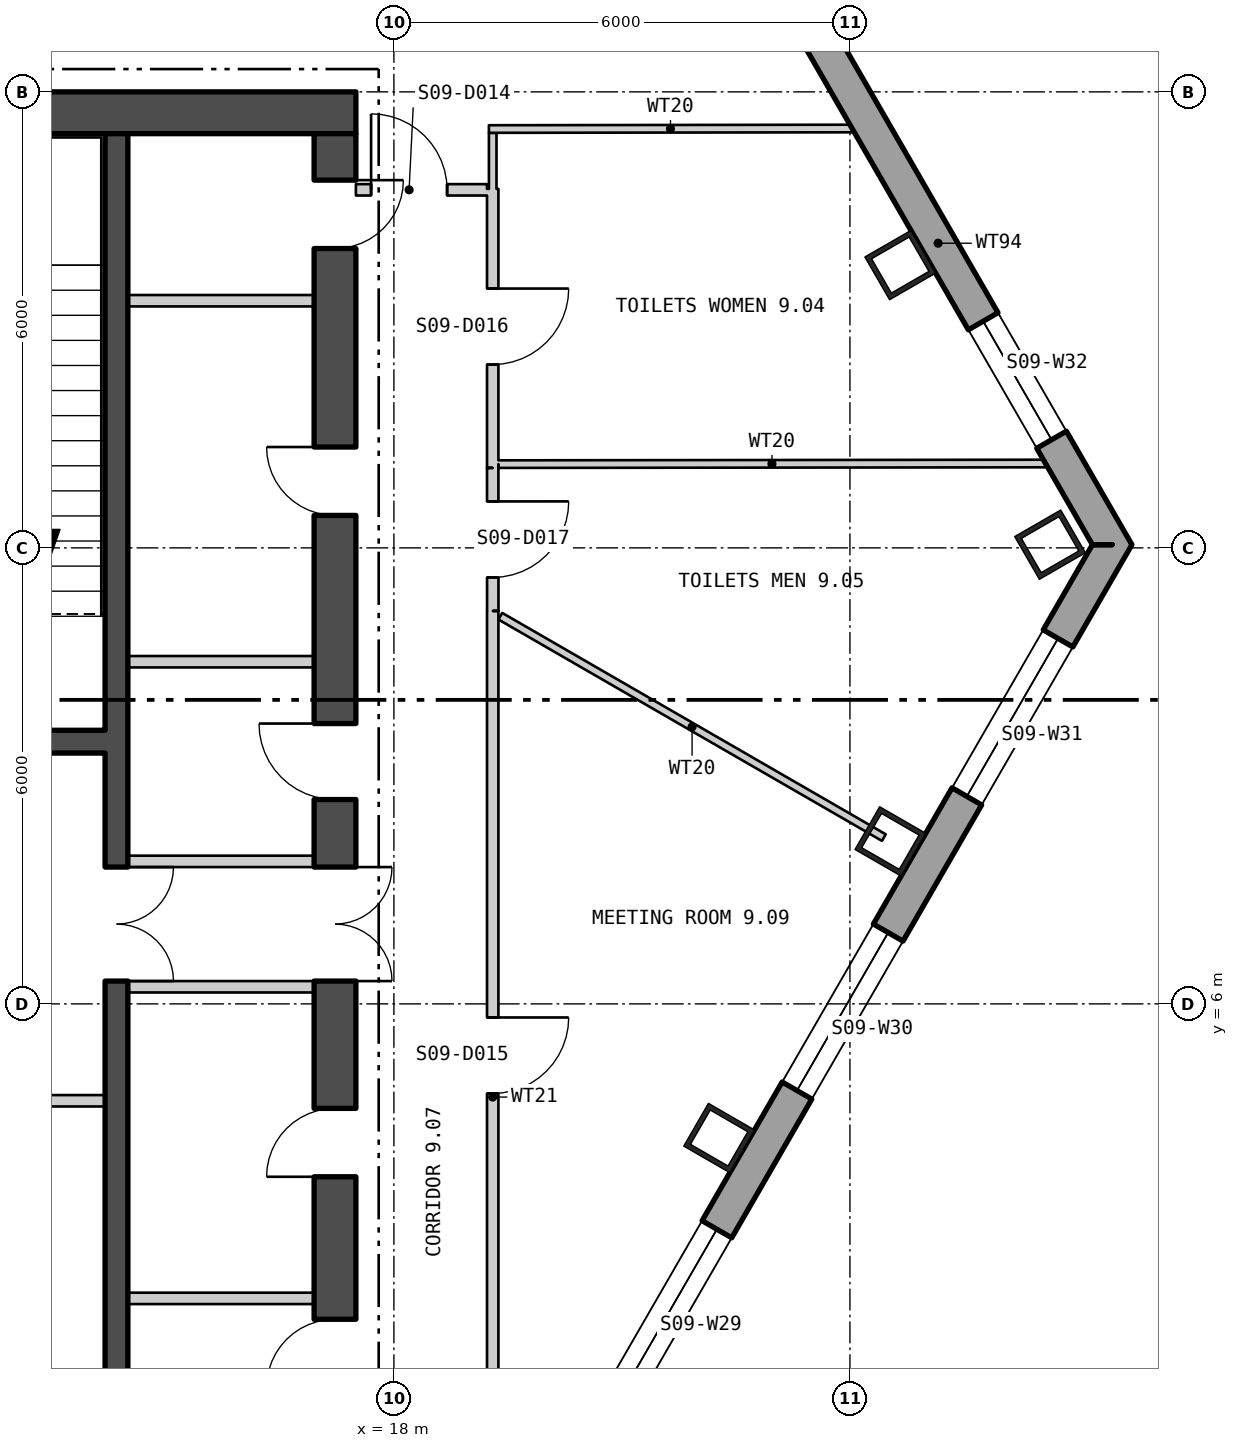
"""IFC4 building model, lengths in metres.
Left out: names, types, materials, properties, quantities, classifications, styles, units other than length and angle.
Written with IfcOpenShell. Run it as: python <this file> out.ifc"""

import sys

from ifc_helpers import new_model, si_unit, direction, frame, frame_2d, origin, origin_2d, place, context, subcontext, project, spatial, polyline, rectangle, hollow_rectangle, outline, extrude, element, fill, save


model = new_model("IFC4")
c1 = context("Model", 3, precision=1e-05, world=origin(), true_north=direction((0.0, 1.0)))
c2 = subcontext(c1, "Body", "Model", "MODEL_VIEW")
j1 = project(units=[si_unit("LENGTHUNIT", "METRE"), si_unit("PLANEANGLEUNIT", "RADIAN")], contexts=[c1])
p1 = place(None, origin())
s1 = spatial("IfcSite", under=j1, at=p1, CompositionType="ELEMENT")
p2 = place(p1, origin())
s2 = spatial("IfcBuilding", under=s1, at=p2, CompositionType="ELEMENT")
p3 = place(p2, frame((0.0, 0.0, 124.8)))
s3 = spatial("IfcBuildingStorey", under=s2, at=p3, CompositionType="ELEMENT", Elevation=124.8)
for number, where, z_axis, x_axis in (
    (1, (22.279, 4.235, 0.0), (0.0, 0.0, 1.0), (0.5, 0.866, 0.0)),
    (2, (24.532, 8.138, 0.0), (0.0, 0.0, 1.0), (0.5, 0.866, 0.0)),
    (3, (26.633, 12.042, 0.0), (0.0, 0.0, 1.0), (-0.5, 0.866, 0.0)),
    (4, (24.662, 15.721, 0.0), (0.0, 0.0, 1.0), (-0.5, 0.866, 0.0)),
):
    element("IfcColumn", number, at=place(p3, frame(where, z_axis=z_axis, x_axis=x_axis)), inside=s3, PredefinedType="COLUMN", context=c2, shape_type="SweptSolid", body=[
        extrude(hollow_rectangle(XDim=0.65, YDim=0.7, WallThickness=0.065, at=origin_2d()), origin(), (0.0, 0.0, 1.0), 4.5),
    ])
p4 = place(p3, frame((4.58, -27.57, -0.18), z_axis=(0.0, 0.0, 1.0), x_axis=(0.500000711659, 0.866024992908, 0.0)))
e5 = element("IfcWall", 5, at=p4, inside=s3, PredefinedType="SOLIDWALL", context=c2, shape_type="SweptSolid", body=[
    extrude(outline(polyline([(-0.13, -0.225), (45.87, -0.225), (45.61, 0.225), (0.13, 0.225), (-0.13, -0.225)])), origin(), (0.0, 0.0, 1.0), 4.28),
])
p5 = place(p4, frame((1.424, 0.0, 1.08)))
e6 = element("IfcOpeningElement", 6, at=p5, cuts=e5, PredefinedType="OPENING", context=c2, shape_type="SweptSolid", body=[
    extrude(rectangle(XDim=2.4, YDim=2.6, at=frame_2d((1.2, 1.3))), frame((0.0, 0.235, 0.0), z_axis=(0.0, -1.0, 0.0), x_axis=(1.0, 0.0, 0.0)), (0.0, 0.0, 1.0), 0.47),
])
p6 = place(p4, frame((5.893, 0.0, 1.08)))
e7 = element("IfcOpeningElement", 7, at=p6, cuts=e5, PredefinedType="OPENING", context=c2, shape_type="SweptSolid", body=[
    extrude(rectangle(XDim=2.4, YDim=2.6, at=frame_2d((1.2, 1.3))), frame((0.0, 0.235, 0.0), z_axis=(0.0, -1.0, 0.0), x_axis=(1.0, 0.0, 0.0)), (0.0, 0.0, 1.0), 0.47),
])
p7 = place(p4, frame((10.401, 0.0, 1.08)))
e8 = element("IfcOpeningElement", 8, at=p7, cuts=e5, PredefinedType="OPENING", context=c2, shape_type="SweptSolid", body=[
    extrude(rectangle(XDim=2.4, YDim=2.6, at=frame_2d((1.2, 1.3))), frame((0.0, 0.235, 0.0), z_axis=(0.0, -1.0, 0.0), x_axis=(1.0, 0.0, 0.0)), (0.0, 0.0, 1.0), 0.47),
])
p8 = place(p4, frame((14.909, 0.0, 1.08)))
e9 = element("IfcOpeningElement", 9, at=p8, cuts=e5, PredefinedType="OPENING", context=c2, shape_type="SweptSolid", body=[
    extrude(rectangle(XDim=2.4, YDim=2.6, at=frame_2d((1.2, 1.3))), frame((0.0, 0.235, 0.0), z_axis=(0.0, -1.0, 0.0), x_axis=(1.0, 0.0, 0.0)), (0.0, 0.0, 1.0), 0.47),
])
p9 = place(p4, frame((19.416, 0.0, 1.08)))
e10 = element("IfcOpeningElement", 10, at=p9, cuts=e5, PredefinedType="OPENING", context=c2, shape_type="SweptSolid", body=[
    extrude(rectangle(XDim=2.4, YDim=2.6, at=frame_2d((1.2, 1.3))), frame((0.0, 0.235, 0.0), z_axis=(0.0, -1.0, 0.0), x_axis=(1.0, 0.0, 0.0)), (0.0, 0.0, 1.0), 0.47),
])
p10 = place(p4, frame((23.924, 0.0, 1.08)))
e11 = element("IfcOpeningElement", 11, at=p10, cuts=e5, PredefinedType="OPENING", context=c2, shape_type="SweptSolid", body=[
    extrude(rectangle(XDim=2.4, YDim=2.6, at=frame_2d((1.2, 1.3))), frame((0.0, 0.235, 0.0), z_axis=(0.0, -1.0, 0.0), x_axis=(1.0, 0.0, 0.0)), (0.0, 0.0, 1.0), 0.47),
])
p11 = place(p4, frame((32.939, 0.0, 1.08)))
e12 = element("IfcOpeningElement", 12, at=p11, cuts=e5, PredefinedType="OPENING", context=c2, shape_type="SweptSolid", body=[
    extrude(rectangle(XDim=2.4, YDim=2.6, at=frame_2d((1.2, 1.3))), frame((0.0, 0.235, 0.0), z_axis=(0.0, -1.0, 0.0), x_axis=(1.0, 0.0, 0.0)), (0.0, 0.0, 1.0), 0.47),
])
p12 = place(p4, frame((37.447, 0.0, 1.08)))
e13 = element("IfcOpeningElement", 13, at=p12, cuts=e5, PredefinedType="OPENING", context=c2, shape_type="SweptSolid", body=[
    extrude(rectangle(XDim=2.4, YDim=2.6, at=frame_2d((1.2, 1.3))), frame((0.0, 0.235, 0.0), z_axis=(0.0, -1.0, 0.0), x_axis=(1.0, 0.0, 0.0)), (0.0, 0.0, 1.0), 0.47),
])
p13 = place(p4, frame((41.916, 0.0, 1.08)))
e14 = element("IfcOpeningElement", 14, at=p13, cuts=e5, PredefinedType="OPENING", context=c2, shape_type="SweptSolid", body=[
    extrude(rectangle(XDim=2.4, YDim=2.6, at=frame_2d((1.2, 1.3))), frame((0.0, 0.235, 0.0), z_axis=(0.0, -1.0, 0.0), x_axis=(1.0, 0.0, 0.0)), (0.0, 0.0, 1.0), 0.47),
])
p14 = place(p3, frame((27.45, 12.042, -0.4), z_axis=(0.0, 0.0, 1.0), x_axis=(-0.499998388237, 0.866026334334, 0.0)))
e15 = element("IfcWall", 15, at=p14, inside=s3, PredefinedType="SOLIDWALL", context=c2, shape_type="SweptSolid", body=[
    extrude(outline(polyline([(-0.13, -0.225), (9.29, -0.225), (9.03, 0.225), (0.13, 0.225), (-0.13, -0.225)])), origin(), (0.0, 0.0, 1.0), 4.5),
])
p15 = place(p14, frame((1.594, 0.0, 1.3)))
e16 = element("IfcOpeningElement", 16, at=p15, cuts=e15, PredefinedType="OPENING", context=c2, shape_type="SweptSolid", body=[
    extrude(rectangle(XDim=1.8, YDim=2.6, at=frame_2d((0.9, 1.3))), frame((0.0, 0.235, 0.0), z_axis=(0.0, -1.0, 0.0), x_axis=(1.0, 0.0, 0.0)), (0.0, 0.0, 1.0), 0.47),
])
p16 = place(p3, frame((-17.5, 17.725, 0.0), z_axis=(0.0, 0.0, 1.0), x_axis=(1.0, 0.0, 0.0)))
e17 = element("IfcWall", 17, at=p16, inside=s3, PredefinedType="SHEAR", context=c2, shape_type="SweptSolid", body=[
    extrude(rectangle(XDim=35.0, YDim=0.55, at=frame_2d((17.5, 0.0))), origin(), (0.0, 0.0, 1.0), 4.3),
])
p17 = place(p3, frame((17.225, 0.55, 0.0), z_axis=(0.0, 0.0, 1.0), x_axis=(0.0, 1.0, 0.0)))
e18 = element("IfcWall", 18, at=p17, inside=s3, PredefinedType="SHEAR", context=c2, shape_type="SweptSolid", body=[
    extrude(rectangle(XDim=16.9, YDim=0.55, at=frame_2d((8.45, 0.0))), origin(), (0.0, 0.0, 1.0), 4.3),
])
p18 = place(p17, frame((5.75, 0.0, 0.0)))
e19 = element("IfcOpeningElement", 19, at=p18, cuts=e18, PredefinedType="OPENING", context=c2, shape_type="SweptSolid", body=[
    extrude(rectangle(XDim=1.5, YDim=2.1, at=frame_2d((0.75, 1.05))), frame((0.0, 0.285, 0.0), z_axis=(0.0, -1.0, 0.0), x_axis=(1.0, 0.0, 0.0)), (0.0, 0.0, 1.0), 0.57),
])
p19 = place(p17, frame((0.4, 0.0, 0.0)))
e20 = element("IfcOpeningElement", 20, at=p19, cuts=e18, PredefinedType="OPENING", context=c2, shape_type="SweptSolid", body=[
    extrude(rectangle(XDim=0.9, YDim=2.1, at=frame_2d((0.45, 1.05))), frame((0.0, 0.285, 0.0), z_axis=(0.0, -1.0, 0.0), x_axis=(1.0, 0.0, 0.0)), (0.0, 0.0, 1.0), 0.57),
])
p20 = place(p17, frame((3.175, 0.0, 0.0)))
e21 = element("IfcOpeningElement", 21, at=p20, cuts=e18, PredefinedType="OPENING", context=c2, shape_type="SweptSolid", body=[
    extrude(rectangle(XDim=0.9, YDim=2.1, at=frame_2d((0.45, 1.05))), frame((0.0, 0.285, 0.0), z_axis=(0.0, -1.0, 0.0), x_axis=(1.0, 0.0, 0.0)), (0.0, 0.0, 1.0), 0.57),
])
p21 = place(p17, frame((8.139, 0.0, 0.0)))
e22 = element("IfcOpeningElement", 22, at=p21, cuts=e18, PredefinedType="OPENING", context=c2, shape_type="SweptSolid", body=[
    extrude(rectangle(XDim=1.0, YDim=2.1, at=frame_2d((0.5, 1.05))), frame((0.0, 0.285, 0.0), z_axis=(0.0, -1.0, 0.0), x_axis=(1.0, 0.0, 0.0)), (0.0, 0.0, 1.0), 0.57),
])
p22 = place(p17, frame((11.877, 0.0, 0.0)))
e23 = element("IfcOpeningElement", 23, at=p22, cuts=e18, PredefinedType="OPENING", context=c2, shape_type="SweptSolid", body=[
    extrude(rectangle(XDim=0.9, YDim=2.1, at=frame_2d((0.45, 1.05))), frame((0.0, 0.285, 0.0), z_axis=(0.0, -1.0, 0.0), x_axis=(1.0, 0.0, 0.0)), (0.0, 0.0, 1.0), 0.57),
])
p23 = place(p17, frame((15.389, 0.0, 0.0)))
e24 = element("IfcOpeningElement", 24, at=p23, cuts=e18, PredefinedType="OPENING", context=c2, shape_type="SweptSolid", body=[
    extrude(rectangle(XDim=0.9, YDim=2.1, at=frame_2d((0.45, 1.05))), frame((0.0, 0.285, 0.0), z_axis=(0.0, -1.0, 0.0), x_axis=(1.0, 0.0, 0.0)), (0.0, 0.0, 1.0), 0.57),
])
p24 = place(p3, frame((14.35, 0.55, 0.0), z_axis=(0.0, 0.0, 1.0), x_axis=(0.0, 1.0, 0.0)))
e25 = element("IfcWall", 25, at=p24, inside=s3, PredefinedType="SHEAR", context=c2, shape_type="SweptSolid", body=[
    extrude(rectangle(XDim=16.9, YDim=0.3, at=frame_2d((8.45, 0.0))), origin(), (0.0, 0.0, 1.0), 4.3),
])
p25 = place(p24, frame((5.75, 0.0, 0.0)))
e26 = element("IfcOpeningElement", 26, at=p25, cuts=e25, PredefinedType="OPENING", context=c2, shape_type="SweptSolid", body=[
    extrude(rectangle(XDim=1.5, YDim=2.1, at=frame_2d((0.75, 1.05))), frame((0.0, 0.16, 0.0), z_axis=(0.0, -1.0, 0.0), x_axis=(1.0, 0.0, 0.0)), (0.0, 0.0, 1.0), 0.32),
])
p26 = place(p3, frame((11.0, 9.45, 0.0), z_axis=(0.0, 0.0, 1.0), x_axis=(1.0, 0.0, 0.0)))
e27 = element("IfcWall", 27, at=p26, inside=s3, PredefinedType="SHEAR", context=c2, shape_type="SweptSolid", body=[
    extrude(rectangle(XDim=3.2, YDim=0.3, at=frame_2d((1.6, 0.0))), origin(), (0.0, 0.0, 1.0), 4.3),
])
p27 = place(p26, frame((1.0, 0.0, 0.0)))
e28 = element("IfcOpeningElement", 28, at=p27, cuts=e27, PredefinedType="OPENING", context=c2, shape_type="SweptSolid", body=[
    extrude(rectangle(XDim=1.2, YDim=2.1, at=frame_2d((0.6, 1.05))), frame((0.0, 0.16, 0.0), z_axis=(0.0, -1.0, 0.0), x_axis=(1.0, 0.0, 0.0)), (0.0, 0.0, 1.0), 0.32),
])
p28 = place(p3, frame((11.0, 4.725, 0.0), z_axis=(0.0, 0.0, 1.0), x_axis=(1.0, 0.0, 0.0)))
e29 = element("IfcWall", 29, at=p28, inside=s3, PredefinedType="PARTITIONING", context=c2, shape_type="SweptSolid", body=[
    extrude(rectangle(XDim=3.2, YDim=0.15, at=frame_2d((1.6, 0.0))), origin(), (0.0, 0.0, 1.0), 4.3),
])
for number, where, z_axis, x_axis in (
    (30, (14.5, 6.225, 0.0), (0.0, 0.0, 1.0), (1.0, 0.0, 0.0)),
    (31, (14.5, 7.875, 0.0), (0.0, 0.0, 1.0), (1.0, 0.0, 0.0)),
    (32, (14.5, 2.125, 0.0), (0.0, 0.0, 1.0), (1.0, 0.0, 0.0)),
    (33, (14.5, 10.502, 0.0), (0.0, 0.0, 1.0), (1.0, 0.0, 0.0)),
    (34, (14.5, 15.252, 0.0), (0.0, 0.0, 1.0), (1.0, 0.0, 0.0)),
):
    element("IfcWall", number, at=place(p3, frame(where, z_axis=z_axis, x_axis=x_axis)), inside=s3, PredefinedType="PARTITIONING", context=c2, shape_type="SweptSolid", body=[
        extrude(rectangle(XDim=2.45, YDim=0.15, at=frame_2d((1.225, 0.0))), origin(), (0.0, 0.0, 1.0), 4.3),
    ])
p29 = place(p3, frame((17.5, 16.711, 0.0), z_axis=(0.0, 0.0, 1.0), x_axis=(1.0, 0.0, 0.0)))
e35 = element("IfcWall", 35, at=p29, inside=s3, PredefinedType="PARTITIONING", context=c2, shape_type="SweptSolid", body=[
    extrude(rectangle(XDim=1.725, YDim=0.15, at=frame_2d((0.863, 0.0))), origin(), (0.0, 0.0, 1.0), 4.3),
])
p30 = place(p29, frame((0.2, 0.0, 0.0)))
e36 = element("IfcOpeningElement", 36, at=p30, cuts=e35, PredefinedType="OPENING", context=c2, shape_type="SweptSolid", body=[
    extrude(rectangle(XDim=1.0, YDim=2.1, at=frame_2d((0.5, 1.05))), frame((0.0, 0.085, 0.0), z_axis=(0.0, -1.0, 0.0), x_axis=(1.0, 0.0, 0.0)), (0.0, 0.0, 1.0), 0.17),
])
p31 = place(p3, frame((19.25, 17.511, 0.0), z_axis=(0.0, 0.0, 1.0), x_axis=(0.999998926819, 0.001465046565, 0.0)))
e37 = element("IfcWall", 37, at=p31, inside=s3, PredefinedType="PARTITIONING", context=c2, shape_type="SweptSolid", body=[
    extrude(rectangle(XDim=4.778, YDim=0.1, at=frame_2d((2.389, 0.0))), origin(), (0.0, 0.0, 1.0), 4.3),
])
p32 = place(p3, frame((19.3, -1.622, 0.0), z_axis=(0.0, 0.0, 1.0), x_axis=(0.0, 1.0, 0.0)))
e38 = element("IfcWall", 38, at=p32, inside=s3, PredefinedType="PARTITIONING", context=c2, shape_type="SweptSolid", body=[
    extrude(rectangle(XDim=12.792, YDim=0.15, at=frame_2d((6.396, 0.0))), origin(), (0.0, 0.0, 1.0), 4.3),
])
p33 = place(p32, frame((6.443, 0.0, 0.0)))
e39 = element("IfcOpeningElement", 39, at=p33, cuts=e38, PredefinedType="OPENING", context=c2, shape_type="SweptSolid", body=[
    extrude(rectangle(XDim=1.0, YDim=2.1, at=frame_2d((0.5, 1.05))), frame((0.0, 0.085, 0.0), z_axis=(0.0, -1.0, 0.0), x_axis=(1.0, 0.0, 0.0)), (0.0, 0.0, 1.0), 0.17),
])
p34 = place(p3, frame((19.3, 13.052, 0.0), z_axis=(0.0, 0.0, 1.0), x_axis=(0.0, 1.0, 0.0)))
e40 = element("IfcWall", 40, at=p34, inside=s3, PredefinedType="PARTITIONING", context=c2, shape_type="SweptSolid", body=[
    extrude(rectangle(XDim=3.671, YDim=0.15, at=frame_2d((1.835, 0.0))), origin(), (0.0, 0.0, 1.0), 4.3),
])
p35 = place(p34, frame((1.36, 0.0, 0.0)))
e41 = element("IfcOpeningElement", 41, at=p35, cuts=e40, PredefinedType="OPENING", context=c2, shape_type="SweptSolid", body=[
    extrude(rectangle(XDim=1.0, YDim=2.1, at=frame_2d((0.5, 1.05))), frame((0.0, 0.085, 0.0), z_axis=(0.0, -1.0, 0.0), x_axis=(1.0, 0.0, 0.0)), (0.0, 0.0, 1.0), 0.17),
])
p36 = place(p3, frame((19.3, 16.723, 0.0), z_axis=(0.0, 0.0, 1.0), x_axis=(0.0, 1.0, 0.0)))
e42 = element("IfcWall", 42, at=p36, inside=s3, PredefinedType="PARTITIONING", context=c2, shape_type="SweptSolid", body=[
    extrude(rectangle(XDim=0.738, YDim=0.1, at=frame_2d((0.369, 0.0))), origin(), (0.0, 0.0, 1.0), 4.3),
])
p37 = place(p3, frame((19.3, 13.052, 0.0), z_axis=(0.0, 0.0, 1.0), x_axis=(0.000531349553, -0.999999858834, 0.0)))
e43 = element("IfcWall", 43, at=p37, inside=s3, PredefinedType="PARTITIONING", context=c2, shape_type="SweptSolid", body=[
    extrude(rectangle(XDim=1.882, YDim=0.15, at=frame_2d((0.941, 0.0))), origin(), (0.0, 0.0, 1.0), 4.3),
])
p38 = place(p37, frame((0.441, 0.0, 0.0)))
e44 = element("IfcOpeningElement", 44, at=p38, cuts=e43, PredefinedType="OPENING", context=c2, shape_type="SweptSolid", body=[
    extrude(rectangle(XDim=1.0, YDim=2.1, at=frame_2d((0.5, 1.05))), frame((0.0, 0.085, 0.0), z_axis=(0.0, -1.0, 0.0), x_axis=(1.0, 0.0, 0.0)), (0.0, 0.0, 1.0), 0.17),
])
p39 = place(p3, frame((19.375, 13.102, 0.0), z_axis=(0.0, 0.0, 1.0), x_axis=(0.999999382374, 0.001111419152, 0.0)))
e45 = element("IfcWall", 45, at=p39, inside=s3, PredefinedType="PARTITIONING", context=c2, shape_type="SweptSolid", body=[
    extrude(rectangle(XDim=7.198, YDim=0.1, at=frame_2d((3.599, 0.0))), origin(), (0.0, 0.0, 1.0), 4.3),
])
p40 = place(p3, frame((19.4, 11.101, 0.0), z_axis=(0.0, 0.0, 1.0), x_axis=(0.866048401274, -0.499960165064, 0.0)))
e46 = element("IfcWall", 46, at=p40, inside=s3, PredefinedType="PARTITIONING", context=c2, shape_type="SweptSolid", body=[
    extrude(rectangle(XDim=5.827, YDim=0.1, at=frame_2d((2.913, 0.0))), origin(), (0.0, 0.0, 1.0), 4.3),
])
p41 = place(p11, origin())
e47 = element("IfcWindow", 47, at=p41, inside=s3, PartitioningType="SINGLE_PANEL", PredefinedType="WINDOW", context=c2, shape_type="SweptSolid", body=[
    extrude(rectangle(XDim=2.4, YDim=2.6, at=frame_2d((1.2, 1.3))), frame((0.0, 0.105, 0.0), z_axis=(0.0, -1.0, 0.0), x_axis=(1.0, 0.0, 0.0)), (0.0, 0.0, 1.0), 0.06),
])
fill(e12, e47)
p42 = place(p12, origin())
e48 = element("IfcWindow", 48, at=p42, inside=s3, PartitioningType="SINGLE_PANEL", PredefinedType="WINDOW", context=c2, shape_type="SweptSolid", body=[
    extrude(rectangle(XDim=2.4, YDim=2.6, at=frame_2d((1.2, 1.3))), frame((0.0, 0.105, 0.0), z_axis=(0.0, -1.0, 0.0), x_axis=(1.0, 0.0, 0.0)), (0.0, 0.0, 1.0), 0.06),
])
fill(e13, e48)
p43 = place(p13, origin())
e49 = element("IfcWindow", 49, at=p43, inside=s3, PartitioningType="SINGLE_PANEL", PredefinedType="WINDOW", context=c2, shape_type="SweptSolid", body=[
    extrude(rectangle(XDim=2.4, YDim=2.6, at=frame_2d((1.2, 1.3))), frame((0.0, 0.105, 0.0), z_axis=(0.0, -1.0, 0.0), x_axis=(1.0, 0.0, 0.0)), (0.0, 0.0, 1.0), 0.06),
])
fill(e14, e49)
p44 = place(p15, origin())
e50 = element("IfcWindow", 50, at=p44, inside=s3, PartitioningType="SINGLE_PANEL", PredefinedType="WINDOW", context=c2, shape_type="SweptSolid", body=[
    extrude(rectangle(XDim=1.8, YDim=2.6, at=frame_2d((0.9, 1.3))), frame((0.0, 0.105, 0.0), z_axis=(0.0, -1.0, 0.0), x_axis=(1.0, 0.0, 0.0)), (0.0, 0.0, 1.0), 0.06),
])
fill(e16, e50)
p45 = place(p25, origin())
e51 = element("IfcDoor", 51, at=p45, inside=s3, OperationType="DOUBLE_DOOR_SINGLE_SWING", PredefinedType="DOOR", context=c2, shape_type="SweptSolid", body=[
    extrude(rectangle(XDim=1.5, YDim=2.1, at=frame_2d((0.75, 1.05))), frame((0.0, 0.025, 0.0), z_axis=(0.0, -1.0, 0.0), x_axis=(1.0, 0.0, 0.0)), (0.0, 0.0, 1.0), 0.05),
])
fill(e26, e51)
p46 = place(p18, origin())
e52 = element("IfcDoor", 52, at=p46, inside=s3, OperationType="DOUBLE_DOOR_SINGLE_SWING", PredefinedType="DOOR", context=c2, shape_type="SweptSolid", body=[
    extrude(rectangle(XDim=1.5, YDim=2.1, at=frame_2d((0.75, 1.05))), frame((0.0, 0.025, 0.0), z_axis=(0.0, -1.0, 0.0), x_axis=(1.0, 0.0, 0.0)), (0.0, 0.0, 1.0), 0.05),
])
fill(e19, e52)
p47 = place(p19, origin())
e53 = element("IfcDoor", 53, at=p47, inside=s3, OperationType="SINGLE_SWING_RIGHT", PredefinedType="DOOR", context=c2, shape_type="SweptSolid", body=[
    extrude(rectangle(XDim=0.9, YDim=2.1, at=frame_2d((0.45, 1.05))), frame((0.0, 0.025, 0.0), z_axis=(0.0, -1.0, 0.0), x_axis=(1.0, 0.0, 0.0)), (0.0, 0.0, 1.0), 0.05),
])
fill(e20, e53)
p48 = place(p20, origin())
e54 = element("IfcDoor", 54, at=p48, inside=s3, OperationType="SINGLE_SWING_RIGHT", PredefinedType="DOOR", context=c2, shape_type="SweptSolid", body=[
    extrude(rectangle(XDim=0.9, YDim=2.1, at=frame_2d((0.45, 1.05))), frame((0.0, 0.025, 0.0), z_axis=(0.0, -1.0, 0.0), x_axis=(1.0, 0.0, 0.0)), (0.0, 0.0, 1.0), 0.05),
])
fill(e21, e54)
p49 = place(p21, origin())
e55 = element("IfcDoor", 55, at=p49, inside=s3, OperationType="SINGLE_SWING_LEFT", PredefinedType="DOOR", context=c2, shape_type="SweptSolid", body=[
    extrude(rectangle(XDim=1.0, YDim=2.1, at=frame_2d((0.5, 1.05))), frame((0.0, 0.025, 0.0), z_axis=(0.0, -1.0, 0.0), x_axis=(1.0, 0.0, 0.0)), (0.0, 0.0, 1.0), 0.05),
])
fill(e22, e55)
p50 = place(p22, origin())
e56 = element("IfcDoor", 56, at=p50, inside=s3, OperationType="SINGLE_SWING_LEFT", PredefinedType="DOOR", context=c2, shape_type="SweptSolid", body=[
    extrude(rectangle(XDim=0.9, YDim=2.1, at=frame_2d((0.45, 1.05))), frame((0.0, 0.025, 0.0), z_axis=(0.0, -1.0, 0.0), x_axis=(1.0, 0.0, 0.0)), (0.0, 0.0, 1.0), 0.05),
])
fill(e23, e56)
p51 = place(p23, origin())
e57 = element("IfcDoor", 57, at=p51, inside=s3, OperationType="SINGLE_SWING_RIGHT", PredefinedType="DOOR", context=c2, shape_type="SweptSolid", body=[
    extrude(rectangle(XDim=0.9, YDim=2.1, at=frame_2d((0.45, 1.05))), frame((0.0, 0.025, 0.0), z_axis=(0.0, -1.0, 0.0), x_axis=(1.0, 0.0, 0.0)), (0.0, 0.0, 1.0), 0.05),
])
fill(e24, e57)
p52 = place(p30, origin())
e58 = element("IfcDoor", 58, at=p52, inside=s3, OperationType="SINGLE_SWING_RIGHT", PredefinedType="DOOR", context=c2, shape_type="SweptSolid", body=[
    extrude(rectangle(XDim=1.0, YDim=2.1, at=frame_2d((0.5, 1.05))), frame((0.0, 0.025, 0.0), z_axis=(0.0, -1.0, 0.0), x_axis=(1.0, 0.0, 0.0)), (0.0, 0.0, 1.0), 0.05),
])
fill(e36, e58)
p53 = place(p33, origin())
e59 = element("IfcDoor", 59, at=p53, inside=s3, OperationType="SINGLE_SWING_RIGHT", PredefinedType="DOOR", context=c2, shape_type="SweptSolid", body=[
    extrude(rectangle(XDim=1.0, YDim=2.1, at=frame_2d((0.5, 1.05))), frame((0.0, 0.025, 0.0), z_axis=(0.0, -1.0, 0.0), x_axis=(1.0, 0.0, 0.0)), (0.0, 0.0, 1.0), 0.05),
])
fill(e39, e59)
p54 = place(p35, origin())
e60 = element("IfcDoor", 60, at=p54, inside=s3, OperationType="SINGLE_SWING_RIGHT", PredefinedType="DOOR", context=c2, shape_type="SweptSolid", body=[
    extrude(rectangle(XDim=1.0, YDim=2.1, at=frame_2d((0.5, 1.05))), frame((0.0, 0.025, 0.0), z_axis=(0.0, -1.0, 0.0), x_axis=(1.0, 0.0, 0.0)), (0.0, 0.0, 1.0), 0.05),
])
fill(e41, e60)
p55 = place(p38, origin())
e61 = element("IfcDoor", 61, at=p55, inside=s3, OperationType="SINGLE_SWING_RIGHT", PredefinedType="DOOR", context=c2, shape_type="SweptSolid", body=[
    extrude(rectangle(XDim=1.0, YDim=2.1, at=frame_2d((0.5, 1.05))), frame((0.0, 0.025, 0.0), z_axis=(0.0, -1.0, 0.0), x_axis=(1.0, 0.0, 0.0)), (0.0, 0.0, 1.0), 0.05),
])
fill(e44, e61)
save(model, sys.argv[1])
